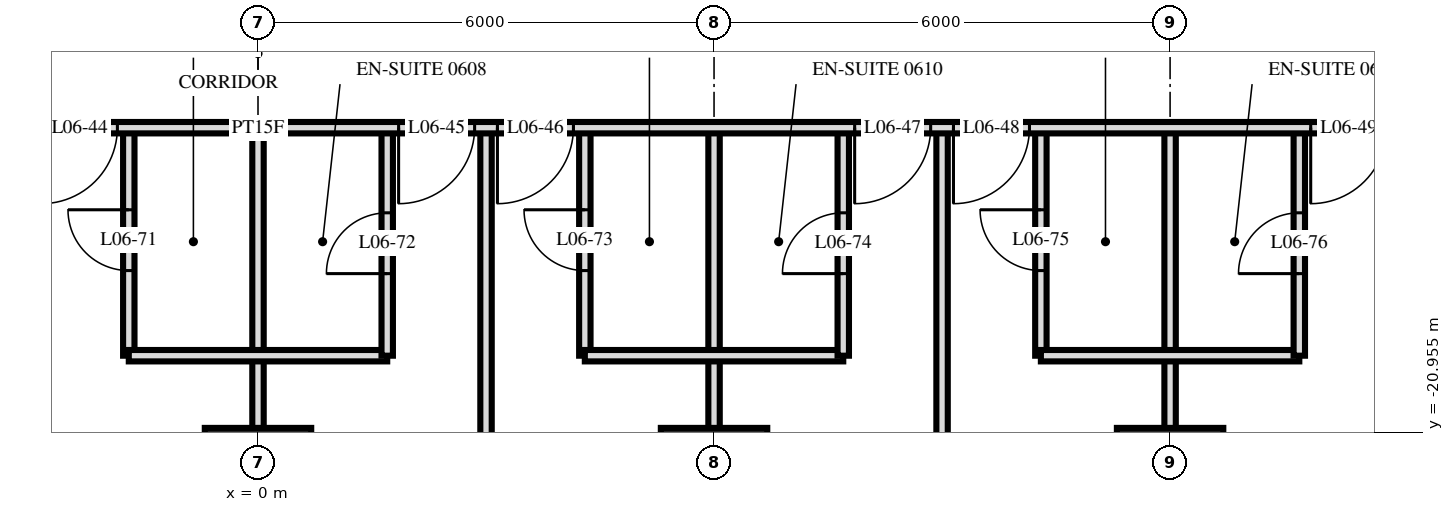
"""IFC4 building model, lengths in metres.
Left out: names, types, materials, properties, quantities, classifications, styles, units other than length and angle.
Written with IfcOpenShell. Run it as: python <this file> out.ifc"""

import sys

from ifc_helpers import new_model, si_unit, direction, frame, frame_2d, origin, origin_2d, place, context, subcontext, project, spatial, rectangle, extrude, element, fill, save


model = new_model("IFC4")
c1 = context("Model", 3, precision=1e-05, world=origin(), true_north=direction((0.0, 1.0)))
c2 = subcontext(c1, "Body", "Model", "MODEL_VIEW")
j1 = project(units=[si_unit("LENGTHUNIT", "METRE"), si_unit("PLANEANGLEUNIT", "RADIAN")], contexts=[c1])
p1 = place(None, origin())
s1 = spatial("IfcSite", under=j1, at=p1, CompositionType="ELEMENT")
p2 = place(p1, origin())
s2 = spatial("IfcBuilding", under=s1, at=p2, CompositionType="ELEMENT")
p3 = place(p2, frame((0.0, 0.0, 31.2)))
s3 = spatial("IfcBuildingStorey", under=s2, at=p3, CompositionType="ELEMENT", Elevation=31.2)
for number, where, z_axis, x_axis in (
    (1, (0.0, -21.6, 0.0), (0.0, 0.0, 1.0), (1.0, 0.0, 0.0)),
    (2, (6.0, -21.6, 0.0), (0.0, 0.0, 1.0), (1.0, 0.0, 0.0)),
    (3, (12.0, -21.6, 0.0), (0.0, 0.0, 1.0), (1.0, 0.0, 0.0)),
):
    element("IfcColumn", number, at=place(p3, frame(where, z_axis=z_axis, x_axis=x_axis)), inside=s3, PredefinedType="COLUMN", context=c2, shape_type="SweptSolid", body=[
        extrude(rectangle(XDim=1.4, YDim=1.4, at=origin_2d()), origin(), (0.0, 0.0, 1.0), 3.6),
    ])
p4 = place(p3, frame((13.7, -19.95, 0.0), z_axis=(0.0, 0.0, 1.0), x_axis=(0.0, 1.0, 0.0)))
e4 = element("IfcWall", 4, at=p4, inside=s3, PredefinedType="PARTITIONING", context=c2, shape_type="SweptSolid", body=[
    extrude(rectangle(XDim=3.0, YDim=0.15, at=frame_2d((1.5, 0.0))), origin(), (0.0, 0.0, 1.0), 3.32),
])
p5 = place(p4, frame((1.08, 0.0, 0.0)))
e5 = element("IfcOpeningElement", 5, at=p5, cuts=e4, PredefinedType="OPENING", context=c2, shape_type="SweptSolid", body=[
    extrude(rectangle(XDim=0.8, YDim=2.1, at=frame_2d((0.4, 1.05))), frame((0.0, 0.085, 0.0), z_axis=(0.0, -1.0, 0.0), x_axis=(1.0, 0.0, 0.0)), (0.0, 0.0, 1.0), 0.17),
])
p6 = place(p3, frame((12.0, -29.22, 0.0), z_axis=(0.0, 0.0, 1.0), x_axis=(0.0, 1.0, 0.0)))
e6 = element("IfcWall", 6, at=p6, inside=s3, PredefinedType="PARTITIONING", context=c2, shape_type="SweptSolid", body=[
    extrude(rectangle(XDim=12.27, YDim=0.15, at=frame_2d((6.135, 0.0))), origin(), (0.0, 0.0, 1.0), 3.32),
])
p7 = place(p3, frame((10.3, -19.95, 0.0), z_axis=(0.0, 0.0, 1.0), x_axis=(0.0, 1.0, 0.0)))
e7 = element("IfcWall", 7, at=p7, inside=s3, PredefinedType="PARTITIONING", context=c2, shape_type="SweptSolid", body=[
    extrude(rectangle(XDim=3.0, YDim=0.15, at=frame_2d((1.5, 0.0))), origin(), (0.0, 0.0, 1.0), 3.32),
])
p8 = place(p7, frame((1.12, 0.0, 0.0)))
e8 = element("IfcOpeningElement", 8, at=p8, cuts=e7, PredefinedType="OPENING", context=c2, shape_type="SweptSolid", body=[
    extrude(rectangle(XDim=0.8, YDim=2.1, at=frame_2d((0.4, 1.05))), frame((0.0, 0.085, 0.0), z_axis=(0.0, -1.0, 0.0), x_axis=(1.0, 0.0, 0.0)), (0.0, 0.0, 1.0), 0.17),
])
p9 = place(p3, frame((9.0, -29.22, 0.0), z_axis=(0.0, 0.0, 1.0), x_axis=(0.0, 1.0, 0.0)))
e9 = element("IfcWall", 9, at=p9, inside=s3, PredefinedType="PARTITIONING", context=c2, shape_type="SweptSolid", body=[
    extrude(rectangle(XDim=12.27, YDim=0.15, at=frame_2d((6.135, 0.0))), origin(), (0.0, 0.0, 1.0), 3.32),
])
p10 = place(p3, frame((7.7, -19.95, 0.0), z_axis=(0.0, 0.0, 1.0), x_axis=(0.0, 1.0, 0.0)))
e10 = element("IfcWall", 10, at=p10, inside=s3, PredefinedType="PARTITIONING", context=c2, shape_type="SweptSolid", body=[
    extrude(rectangle(XDim=3.0, YDim=0.15, at=frame_2d((1.5, 0.0))), origin(), (0.0, 0.0, 1.0), 3.32),
])
p11 = place(p10, frame((1.08, 0.0, 0.0)))
e11 = element("IfcOpeningElement", 11, at=p11, cuts=e10, PredefinedType="OPENING", context=c2, shape_type="SweptSolid", body=[
    extrude(rectangle(XDim=0.8, YDim=2.1, at=frame_2d((0.4, 1.05))), frame((0.0, 0.085, 0.0), z_axis=(0.0, -1.0, 0.0), x_axis=(1.0, 0.0, 0.0)), (0.0, 0.0, 1.0), 0.17),
])
p12 = place(p3, frame((6.0, -29.22, 0.0), z_axis=(0.0, 0.0, 1.0), x_axis=(0.0, 1.0, 0.0)))
e12 = element("IfcWall", 12, at=p12, inside=s3, PredefinedType="PARTITIONING", context=c2, shape_type="SweptSolid", body=[
    extrude(rectangle(XDim=12.27, YDim=0.15, at=frame_2d((6.135, 0.0))), origin(), (0.0, 0.0, 1.0), 3.32),
])
p13 = place(p3, frame((4.3, -19.95, 0.0), z_axis=(0.0, 0.0, 1.0), x_axis=(0.0, 1.0, 0.0)))
e13 = element("IfcWall", 13, at=p13, inside=s3, PredefinedType="PARTITIONING", context=c2, shape_type="SweptSolid", body=[
    extrude(rectangle(XDim=3.0, YDim=0.15, at=frame_2d((1.5, 0.0))), origin(), (0.0, 0.0, 1.0), 3.32),
])
p14 = place(p13, frame((1.12, 0.0, 0.0)))
e14 = element("IfcOpeningElement", 14, at=p14, cuts=e13, PredefinedType="OPENING", context=c2, shape_type="SweptSolid", body=[
    extrude(rectangle(XDim=0.8, YDim=2.1, at=frame_2d((0.4, 1.05))), frame((0.0, 0.085, 0.0), z_axis=(0.0, -1.0, 0.0), x_axis=(1.0, 0.0, 0.0)), (0.0, 0.0, 1.0), 0.17),
])
p15 = place(p3, frame((3.0, -29.22, 0.0), z_axis=(0.0, 0.0, 1.0), x_axis=(0.0, 1.0, 0.0)))
e15 = element("IfcWall", 15, at=p15, inside=s3, PredefinedType="PARTITIONING", context=c2, shape_type="SweptSolid", body=[
    extrude(rectangle(XDim=12.27, YDim=0.15, at=frame_2d((6.135, 0.0))), origin(), (0.0, 0.0, 1.0), 3.32),
])
p16 = place(p3, frame((1.7, -19.95, 0.0), z_axis=(0.0, 0.0, 1.0), x_axis=(0.0, 1.0, 0.0)))
e16 = element("IfcWall", 16, at=p16, inside=s3, PredefinedType="PARTITIONING", context=c2, shape_type="SweptSolid", body=[
    extrude(rectangle(XDim=3.0, YDim=0.15, at=frame_2d((1.5, 0.0))), origin(), (0.0, 0.0, 1.0), 3.32),
])
p17 = place(p16, frame((1.08, 0.0, 0.0)))
e17 = element("IfcOpeningElement", 17, at=p17, cuts=e16, PredefinedType="OPENING", context=c2, shape_type="SweptSolid", body=[
    extrude(rectangle(XDim=0.8, YDim=2.1, at=frame_2d((0.4, 1.05))), frame((0.0, 0.085, 0.0), z_axis=(0.0, -1.0, 0.0), x_axis=(1.0, 0.0, 0.0)), (0.0, 0.0, 1.0), 0.17),
])
p18 = place(p3, frame((0.0, -29.22, 0.0), z_axis=(0.0, 0.0, 1.0), x_axis=(0.0, 1.0, 0.0)))
e18 = element("IfcWall", 18, at=p18, inside=s3, PredefinedType="PARTITIONING", context=c2, shape_type="SweptSolid", body=[
    extrude(rectangle(XDim=12.27, YDim=0.15, at=frame_2d((6.135, 0.0))), origin(), (0.0, 0.0, 1.0), 3.32),
])
p19 = place(p3, frame((-1.7, -19.95, 0.0), z_axis=(0.0, 0.0, 1.0), x_axis=(0.0, 1.0, 0.0)))
e19 = element("IfcWall", 19, at=p19, inside=s3, PredefinedType="PARTITIONING", context=c2, shape_type="SweptSolid", body=[
    extrude(rectangle(XDim=3.0, YDim=0.15, at=frame_2d((1.5, 0.0))), origin(), (0.0, 0.0, 1.0), 3.32),
])
p20 = place(p19, frame((1.12, 0.0, 0.0)))
e20 = element("IfcOpeningElement", 20, at=p20, cuts=e19, PredefinedType="OPENING", context=c2, shape_type="SweptSolid", body=[
    extrude(rectangle(XDim=0.8, YDim=2.1, at=frame_2d((0.4, 1.05))), frame((0.0, 0.085, 0.0), z_axis=(0.0, -1.0, 0.0), x_axis=(1.0, 0.0, 0.0)), (0.0, 0.0, 1.0), 0.17),
])
for number, where, z_axis, x_axis in (
    (21, (-1.7, -19.95, 0.0), (0.0, 0.0, 1.0), (1.0, 0.0, 0.0)),
    (22, (4.3, -19.95, 0.0), (0.0, 0.0, 1.0), (1.0, 0.0, 0.0)),
    (23, (10.3, -19.95, 0.0), (0.0, 0.0, 1.0), (1.0, 0.0, 0.0)),
):
    element("IfcWall", number, at=place(p3, frame(where, z_axis=z_axis, x_axis=x_axis)), inside=s3, PredefinedType="PARTITIONING", context=c2, shape_type="SweptSolid", body=[
        extrude(rectangle(XDim=3.4, YDim=0.15, at=frame_2d((1.7, 0.0))), origin(), (0.0, 0.0, 1.0), 3.32),
    ])
p21 = place(p3, frame((-33.12, -16.95, 0.0), z_axis=(0.0, 0.0, 1.0), x_axis=(1.0, 0.0, 0.0)))
e24 = element("IfcWall", 24, at=p21, inside=s3, PredefinedType="PARTITIONING", context=c2, shape_type="SweptSolid", body=[
    extrude(rectangle(XDim=66.24, YDim=0.15, at=frame_2d((33.12, 0.0))), origin(), (0.0, 0.0, 1.0), 3.32),
])
p22 = place(p21, frame((9.27, 0.0, 0.0)))
e25 = element("IfcOpeningElement", 25, at=p22, cuts=e24, PredefinedType="OPENING", context=c2, shape_type="SweptSolid", body=[
    extrude(rectangle(XDim=1.0, YDim=2.1, at=frame_2d((0.5, 1.05))), frame((0.0, 0.085, 0.0), z_axis=(0.0, -1.0, 0.0), x_axis=(1.0, 0.0, 0.0)), (0.0, 0.0, 1.0), 0.17),
])
p23 = place(p21, frame((13.97, 0.0, 0.0)))
e26 = element("IfcOpeningElement", 26, at=p23, cuts=e24, PredefinedType="OPENING", context=c2, shape_type="SweptSolid", body=[
    extrude(rectangle(XDim=1.0, YDim=2.1, at=frame_2d((0.5, 1.05))), frame((0.0, 0.085, 0.0), z_axis=(0.0, -1.0, 0.0), x_axis=(1.0, 0.0, 0.0)), (0.0, 0.0, 1.0), 0.17),
])
p24 = place(p21, frame((15.27, 0.0, 0.0)))
e27 = element("IfcOpeningElement", 27, at=p24, cuts=e24, PredefinedType="OPENING", context=c2, shape_type="SweptSolid", body=[
    extrude(rectangle(XDim=1.0, YDim=2.1, at=frame_2d((0.5, 1.05))), frame((0.0, 0.085, 0.0), z_axis=(0.0, -1.0, 0.0), x_axis=(1.0, 0.0, 0.0)), (0.0, 0.0, 1.0), 0.17),
])
p25 = place(p21, frame((19.97, 0.0, 0.0)))
e28 = element("IfcOpeningElement", 28, at=p25, cuts=e24, PredefinedType="OPENING", context=c2, shape_type="SweptSolid", body=[
    extrude(rectangle(XDim=1.0, YDim=2.1, at=frame_2d((0.5, 1.05))), frame((0.0, 0.085, 0.0), z_axis=(0.0, -1.0, 0.0), x_axis=(1.0, 0.0, 0.0)), (0.0, 0.0, 1.0), 0.17),
])
p26 = place(p21, frame((22.27, 0.0, 0.0)))
e29 = element("IfcOpeningElement", 29, at=p26, cuts=e24, PredefinedType="OPENING", context=c2, shape_type="SweptSolid", body=[
    extrude(rectangle(XDim=1.0, YDim=2.1, at=frame_2d((0.5, 1.05))), frame((0.0, 0.085, 0.0), z_axis=(0.0, -1.0, 0.0), x_axis=(1.0, 0.0, 0.0)), (0.0, 0.0, 1.0), 0.17),
])
p27 = place(p21, frame((28.97, 0.0, 0.0)))
e30 = element("IfcOpeningElement", 30, at=p27, cuts=e24, PredefinedType="OPENING", context=c2, shape_type="SweptSolid", body=[
    extrude(rectangle(XDim=1.0, YDim=2.1, at=frame_2d((0.5, 1.05))), frame((0.0, 0.085, 0.0), z_axis=(0.0, -1.0, 0.0), x_axis=(1.0, 0.0, 0.0)), (0.0, 0.0, 1.0), 0.17),
])
p28 = place(p21, frame((30.27, 0.0, 0.0)))
e31 = element("IfcOpeningElement", 31, at=p28, cuts=e24, PredefinedType="OPENING", context=c2, shape_type="SweptSolid", body=[
    extrude(rectangle(XDim=1.0, YDim=2.1, at=frame_2d((0.5, 1.05))), frame((0.0, 0.085, 0.0), z_axis=(0.0, -1.0, 0.0), x_axis=(1.0, 0.0, 0.0)), (0.0, 0.0, 1.0), 0.17),
])
p29 = place(p21, frame((34.97, 0.0, 0.0)))
e32 = element("IfcOpeningElement", 32, at=p29, cuts=e24, PredefinedType="OPENING", context=c2, shape_type="SweptSolid", body=[
    extrude(rectangle(XDim=1.0, YDim=2.1, at=frame_2d((0.5, 1.05))), frame((0.0, 0.085, 0.0), z_axis=(0.0, -1.0, 0.0), x_axis=(1.0, 0.0, 0.0)), (0.0, 0.0, 1.0), 0.17),
])
p30 = place(p21, frame((36.27, 0.0, 0.0)))
e33 = element("IfcOpeningElement", 33, at=p30, cuts=e24, PredefinedType="OPENING", context=c2, shape_type="SweptSolid", body=[
    extrude(rectangle(XDim=1.0, YDim=2.1, at=frame_2d((0.5, 1.05))), frame((0.0, 0.085, 0.0), z_axis=(0.0, -1.0, 0.0), x_axis=(1.0, 0.0, 0.0)), (0.0, 0.0, 1.0), 0.17),
])
p31 = place(p21, frame((40.97, 0.0, 0.0)))
e34 = element("IfcOpeningElement", 34, at=p31, cuts=e24, PredefinedType="OPENING", context=c2, shape_type="SweptSolid", body=[
    extrude(rectangle(XDim=1.0, YDim=2.1, at=frame_2d((0.5, 1.05))), frame((0.0, 0.085, 0.0), z_axis=(0.0, -1.0, 0.0), x_axis=(1.0, 0.0, 0.0)), (0.0, 0.0, 1.0), 0.17),
])
p32 = place(p21, frame((42.27, 0.0, 0.0)))
e35 = element("IfcOpeningElement", 35, at=p32, cuts=e24, PredefinedType="OPENING", context=c2, shape_type="SweptSolid", body=[
    extrude(rectangle(XDim=1.0, YDim=2.1, at=frame_2d((0.5, 1.05))), frame((0.0, 0.085, 0.0), z_axis=(0.0, -1.0, 0.0), x_axis=(1.0, 0.0, 0.0)), (0.0, 0.0, 1.0), 0.17),
])
p33 = place(p21, frame((46.97, 0.0, 0.0)))
e36 = element("IfcOpeningElement", 36, at=p33, cuts=e24, PredefinedType="OPENING", context=c2, shape_type="SweptSolid", body=[
    extrude(rectangle(XDim=1.0, YDim=2.1, at=frame_2d((0.5, 1.05))), frame((0.0, 0.085, 0.0), z_axis=(0.0, -1.0, 0.0), x_axis=(1.0, 0.0, 0.0)), (0.0, 0.0, 1.0), 0.17),
])
p34 = place(p21, frame((48.27, 0.0, 0.0)))
e37 = element("IfcOpeningElement", 37, at=p34, cuts=e24, PredefinedType="OPENING", context=c2, shape_type="SweptSolid", body=[
    extrude(rectangle(XDim=1.0, YDim=2.1, at=frame_2d((0.5, 1.05))), frame((0.0, 0.085, 0.0), z_axis=(0.0, -1.0, 0.0), x_axis=(1.0, 0.0, 0.0)), (0.0, 0.0, 1.0), 0.17),
])
p35 = place(p21, frame((52.97, 0.0, 0.0)))
e38 = element("IfcOpeningElement", 38, at=p35, cuts=e24, PredefinedType="OPENING", context=c2, shape_type="SweptSolid", body=[
    extrude(rectangle(XDim=1.0, YDim=2.1, at=frame_2d((0.5, 1.05))), frame((0.0, 0.085, 0.0), z_axis=(0.0, -1.0, 0.0), x_axis=(1.0, 0.0, 0.0)), (0.0, 0.0, 1.0), 0.17),
])
p36 = place(p21, frame((54.27, 0.0, 0.0)))
e39 = element("IfcOpeningElement", 39, at=p36, cuts=e24, PredefinedType="OPENING", context=c2, shape_type="SweptSolid", body=[
    extrude(rectangle(XDim=1.0, YDim=2.1, at=frame_2d((0.5, 1.05))), frame((0.0, 0.085, 0.0), z_axis=(0.0, -1.0, 0.0), x_axis=(1.0, 0.0, 0.0)), (0.0, 0.0, 1.0), 0.17),
])
p37 = place(p21, frame((4.4, 0.0, 0.0)))
e40 = element("IfcOpeningElement", 40, at=p37, cuts=e24, PredefinedType="OPENING", context=c2, shape_type="SweptSolid", body=[
    extrude(rectangle(XDim=1.0, YDim=2.1, at=frame_2d((0.5, 1.05))), frame((0.0, 0.085, 0.0), z_axis=(0.0, -1.0, 0.0), x_axis=(1.0, 0.0, 0.0)), (0.0, 0.0, 1.0), 0.17),
])
p38 = place(p21, frame((60.8, 0.0, 0.0)))
e41 = element("IfcOpeningElement", 41, at=p38, cuts=e24, PredefinedType="OPENING", context=c2, shape_type="SweptSolid", body=[
    extrude(rectangle(XDim=1.0, YDim=2.1, at=frame_2d((0.5, 1.05))), frame((0.0, 0.085, 0.0), z_axis=(0.0, -1.0, 0.0), x_axis=(1.0, 0.0, 0.0)), (0.0, 0.0, 1.0), 0.17),
])
p39 = place(p28, frame((0.5, 0.0, 0.0), z_axis=(0.0, 0.0, 1.0), x_axis=(-1.0, 0.0, 0.0)))
e42 = element("IfcDoor", 42, at=p39, inside=s3, OperationType="SINGLE_SWING_LEFT", PredefinedType="DOOR", context=c2, shape_type="SweptSolid", body=[
    extrude(rectangle(XDim=1.0, YDim=2.1, at=frame_2d((0.0, 1.05))), frame((0.0, -0.025, 0.0), z_axis=(0.0, 1.0, 0.0), x_axis=(-1.0, 0.0, 0.0)), (0.0, 0.0, 1.0), 0.05),
])
fill(e31, e42)
p40 = place(p29, frame((0.5, 0.0, 0.0), z_axis=(0.0, 0.0, 1.0), x_axis=(-1.0, 0.0, 0.0)))
e43 = element("IfcDoor", 43, at=p40, inside=s3, OperationType="SINGLE_SWING_LEFT", PredefinedType="DOOR", context=c2, shape_type="SweptSolid", body=[
    extrude(rectangle(XDim=1.0, YDim=2.1, at=frame_2d((0.0, 1.05))), frame((0.0, -0.025, 0.0), z_axis=(0.0, 1.0, 0.0), x_axis=(-1.0, 0.0, 0.0)), (0.0, 0.0, 1.0), 0.05),
])
fill(e32, e43)
p41 = place(p30, frame((0.5, 0.0, 0.0), z_axis=(0.0, 0.0, 1.0), x_axis=(-1.0, 0.0, 0.0)))
e44 = element("IfcDoor", 44, at=p41, inside=s3, OperationType="SINGLE_SWING_LEFT", PredefinedType="DOOR", context=c2, shape_type="SweptSolid", body=[
    extrude(rectangle(XDim=1.0, YDim=2.1, at=frame_2d((0.0, 1.05))), frame((0.0, -0.025, 0.0), z_axis=(0.0, 1.0, 0.0), x_axis=(-1.0, 0.0, 0.0)), (0.0, 0.0, 1.0), 0.05),
])
fill(e33, e44)
p42 = place(p31, frame((0.5, 0.0, 0.0), z_axis=(0.0, 0.0, 1.0), x_axis=(-1.0, 0.0, 0.0)))
e45 = element("IfcDoor", 45, at=p42, inside=s3, OperationType="SINGLE_SWING_LEFT", PredefinedType="DOOR", context=c2, shape_type="SweptSolid", body=[
    extrude(rectangle(XDim=1.0, YDim=2.1, at=frame_2d((0.0, 1.05))), frame((0.0, -0.025, 0.0), z_axis=(0.0, 1.0, 0.0), x_axis=(-1.0, 0.0, 0.0)), (0.0, 0.0, 1.0), 0.05),
])
fill(e34, e45)
p43 = place(p32, frame((0.5, 0.0, 0.0), z_axis=(0.0, 0.0, 1.0), x_axis=(-1.0, 0.0, 0.0)))
e46 = element("IfcDoor", 46, at=p43, inside=s3, OperationType="SINGLE_SWING_LEFT", PredefinedType="DOOR", context=c2, shape_type="SweptSolid", body=[
    extrude(rectangle(XDim=1.0, YDim=2.1, at=frame_2d((0.0, 1.05))), frame((0.0, -0.025, 0.0), z_axis=(0.0, 1.0, 0.0), x_axis=(-1.0, 0.0, 0.0)), (0.0, 0.0, 1.0), 0.05),
])
fill(e35, e46)
p44 = place(p33, frame((0.5, 0.0, 0.0), z_axis=(0.0, 0.0, 1.0), x_axis=(-1.0, 0.0, 0.0)))
e47 = element("IfcDoor", 47, at=p44, inside=s3, OperationType="SINGLE_SWING_LEFT", PredefinedType="DOOR", context=c2, shape_type="SweptSolid", body=[
    extrude(rectangle(XDim=1.0, YDim=2.1, at=frame_2d((0.0, 1.05))), frame((0.0, -0.025, 0.0), z_axis=(0.0, 1.0, 0.0), x_axis=(-1.0, 0.0, 0.0)), (0.0, 0.0, 1.0), 0.05),
])
fill(e36, e47)
p45 = place(p20, origin())
e48 = element("IfcDoor", 48, at=p45, inside=s3, OperationType="SINGLE_SWING_LEFT", PredefinedType="DOOR", context=c2, shape_type="SweptSolid", body=[
    extrude(rectangle(XDim=0.8, YDim=2.1, at=frame_2d((0.4, 1.05))), frame((0.0, 0.025, 0.0), z_axis=(0.0, -1.0, 0.0), x_axis=(1.0, 0.0, 0.0)), (0.0, 0.0, 1.0), 0.05),
])
fill(e20, e48)
p46 = place(p17, origin())
e49 = element("IfcDoor", 49, at=p46, inside=s3, OperationType="SINGLE_SWING_RIGHT", PredefinedType="DOOR", context=c2, shape_type="SweptSolid", body=[
    extrude(rectangle(XDim=0.8, YDim=2.1, at=frame_2d((0.4, 1.05))), frame((0.0, 0.025, 0.0), z_axis=(0.0, -1.0, 0.0), x_axis=(1.0, 0.0, 0.0)), (0.0, 0.0, 1.0), 0.05),
])
fill(e17, e49)
p47 = place(p14, origin())
e50 = element("IfcDoor", 50, at=p47, inside=s3, OperationType="SINGLE_SWING_LEFT", PredefinedType="DOOR", context=c2, shape_type="SweptSolid", body=[
    extrude(rectangle(XDim=0.8, YDim=2.1, at=frame_2d((0.4, 1.05))), frame((0.0, 0.025, 0.0), z_axis=(0.0, -1.0, 0.0), x_axis=(1.0, 0.0, 0.0)), (0.0, 0.0, 1.0), 0.05),
])
fill(e14, e50)
p48 = place(p11, origin())
e51 = element("IfcDoor", 51, at=p48, inside=s3, OperationType="SINGLE_SWING_RIGHT", PredefinedType="DOOR", context=c2, shape_type="SweptSolid", body=[
    extrude(rectangle(XDim=0.8, YDim=2.1, at=frame_2d((0.4, 1.05))), frame((0.0, 0.025, 0.0), z_axis=(0.0, -1.0, 0.0), x_axis=(1.0, 0.0, 0.0)), (0.0, 0.0, 1.0), 0.05),
])
fill(e11, e51)
p49 = place(p8, origin())
e52 = element("IfcDoor", 52, at=p49, inside=s3, OperationType="SINGLE_SWING_LEFT", PredefinedType="DOOR", context=c2, shape_type="SweptSolid", body=[
    extrude(rectangle(XDim=0.8, YDim=2.1, at=frame_2d((0.4, 1.05))), frame((0.0, 0.025, 0.0), z_axis=(0.0, -1.0, 0.0), x_axis=(1.0, 0.0, 0.0)), (0.0, 0.0, 1.0), 0.05),
])
fill(e8, e52)
p50 = place(p5, origin())
e53 = element("IfcDoor", 53, at=p50, inside=s3, OperationType="SINGLE_SWING_RIGHT", PredefinedType="DOOR", context=c2, shape_type="SweptSolid", body=[
    extrude(rectangle(XDim=0.8, YDim=2.1, at=frame_2d((0.4, 1.05))), frame((0.0, 0.025, 0.0), z_axis=(0.0, -1.0, 0.0), x_axis=(1.0, 0.0, 0.0)), (0.0, 0.0, 1.0), 0.05),
])
fill(e5, e53)
save(model, sys.argv[1])
